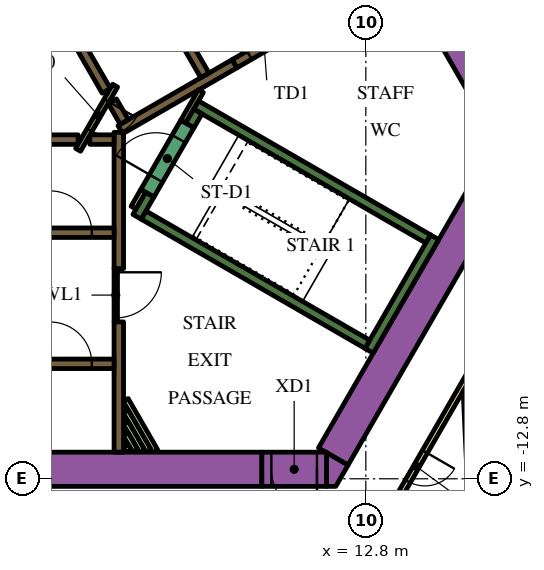
"""IFC4 building model, lengths in metres.
Left out: names, types, materials, properties, quantities, classifications, styles, units other than length and angle.
Written with IfcOpenShell. Run it as: python <this file> out.ifc"""

import sys

from ifc_helpers import new_model, si_unit, direction, frame, frame_2d, origin, place, context, subcontext, project, spatial, polyline, rectangle, outline, extrude, element, fill, save


model = new_model("IFC4")
c1 = context("Model", 3, precision=1e-05, world=origin(), true_north=direction((0.0, 1.0)))
c2 = subcontext(c1, "Body", "Model", "MODEL_VIEW")
j1 = project(units=[si_unit("LENGTHUNIT", "METRE"), si_unit("PLANEANGLEUNIT", "RADIAN")], contexts=[c1])
p1 = place(None, origin())
s1 = spatial("IfcSite", under=j1, at=p1, CompositionType="ELEMENT")
p2 = place(p1, origin())
s2 = spatial("IfcBuilding", under=s1, at=p2, CompositionType="ELEMENT")
p3 = place(p2, frame((0.0, 0.0, 43.2)))
s3 = spatial("IfcBuildingStorey", under=s2, at=p3, CompositionType="ELEMENT", Elevation=43.2)
p4 = place(p3, frame((6.776, 13.364, 0.0), z_axis=(0.0, 0.0, 1.0), x_axis=(0.500004177138, -0.8660229921, 0.0)))
e1 = element("IfcWall", 1, at=p4, inside=s3, PredefinedType="SOLIDWALL", context=c2, shape_type="SweptSolid", body=[
    extrude(rectangle(XDim=20.204, YDim=0.9, at=frame_2d((10.102, 0.0))), origin(), (0.0, 0.0, 1.0), 3.9),
])
p5 = place(p3, frame((11.943, -12.214, 0.0), z_axis=(0.0, 0.0, 1.0), x_axis=(0.49998092645, 0.866036415623, 0.0)))
e2 = element("IfcWall", 2, at=p5, inside=s3, PredefinedType="SOLIDWALL", context=c2, shape_type="SweptSolid", body=[
    extrude(rectangle(XDim=8.83, YDim=0.9, at=frame_2d((4.415, 0.0))), origin(), (0.0, 0.0, 1.0), 3.9),
])
p6 = place(p3, origin())
e3 = element("IfcWall", 3, at=p6, inside=s3, PredefinedType="SOLIDWALL", context=c2, shape_type="SweptSolid", body=[
    extrude(outline(polyline([(12.009, -13.0), (11.764, -13.0), (11.764, -12.113), (12.332, -12.441), (12.009, -13.0)])), origin(), (0.0, 0.0, 1.0), 3.9),
])
p7 = place(p3, frame((-12.019, -12.55, 0.0), z_axis=(0.0, 0.0, 1.0), x_axis=(1.0, 0.0, 0.0)))
e4 = element("IfcWall", 4, at=p7, inside=s3, PredefinedType="SOLIDWALL", context=c2, shape_type="SweptSolid", body=[
    extrude(rectangle(XDim=22.083, YDim=0.9, at=frame_2d((11.042, 0.0))), origin(), (0.0, 0.0, 1.0), 3.9),
])
p8 = place(p3, frame((12.885, -9.431, 0.0), z_axis=(0.0, 0.0, 1.0), x_axis=(0.500020560727, 0.866013532718, 0.0)))
e5 = element("IfcWall", 5, at=p8, inside=s3, PredefinedType="SOLIDWALL", context=c2, shape_type="SweptSolid", body=[
    extrude(rectangle(XDim=3.45, YDim=0.25, at=frame_2d((1.725, 0.0))), origin(), (0.0, 0.0, 1.0), 3.9),
])
p9 = place(p3, frame((12.84, -9.261, 0.0), z_axis=(0.0, 0.0, 1.0), x_axis=(-0.866013990052, 0.500019768644, 0.0)))
e6 = element("IfcWall", 6, at=p9, inside=s3, PredefinedType="SOLIDWALL", context=c2, shape_type="SweptSolid", body=[
    extrude(rectangle(XDim=6.8, YDim=0.25, at=frame_2d((3.4, 0.0))), origin(), (0.0, 0.0, 1.0), 3.9),
])
p10 = place(p3, frame((6.78, -5.906, 0.0), z_axis=(0.0, 0.0, 1.0), x_axis=(0.500223362819, 0.865896406789, 0.0)))
e7 = element("IfcWall", 7, at=p10, inside=s3, PredefinedType="SOLIDWALL", context=c2, shape_type="SweptSolid", body=[
    extrude(rectangle(XDim=0.675, YDim=0.25, at=frame_2d((0.337, 0.0))), origin(), (0.0, 0.0, 1.0), 3.9),
])
p11 = place(p3, frame((8.334, -2.964, 0.0), z_axis=(0.0, 0.0, 1.0), x_axis=(0.866016039709, -0.500016218704, 0.0)))
e8 = element("IfcWall", 8, at=p11, inside=s3, PredefinedType="SOLIDWALL", context=c2, shape_type="SweptSolid", body=[
    extrude(rectangle(XDim=7.05, YDim=0.25, at=frame_2d((3.525, 0.0))), origin(), (0.0, 0.0, 1.0), 3.9),
])
p12 = place(p3, frame((8.168, -3.503, 0.0), z_axis=(0.0, 0.0, 1.0), x_axis=(0.49972245349, 0.866185586049, 0.0)))
e9 = element("IfcWall", 9, at=p12, inside=s3, PredefinedType="SOLIDWALL", context=c2, shape_type="SweptSolid", body=[
    extrude(rectangle(XDim=0.425, YDim=0.25, at=frame_2d((0.212, 0.0))), origin(), (0.0, 0.0, 1.0), 3.9),
])
p13 = place(p3, frame((-5.259, -3.875, 0.0), z_axis=(0.0, 0.0, 1.0), x_axis=(1.0, 0.0, 0.0)))
e10 = element("IfcWall", 10, at=p13, inside=s3, PredefinedType="SOLIDWALL", context=c2, shape_type="SweptSolid", body=[
    extrude(rectangle(XDim=10.489, YDim=0.25, at=frame_2d((5.244, 0.0))), origin(), (0.0, 0.0, 1.0), 3.9),
])
p14 = place(p3, frame((6.3, -7.27, 0.0), z_axis=(0.0, 0.0, 1.0), x_axis=(0.0, 1.0, 0.0)))
e11 = element("IfcWall", 11, at=p14, inside=s3, PredefinedType="SOLIDWALL", context=c2, shape_type="SweptSolid", body=[
    extrude(rectangle(XDim=3.586, YDim=0.25, at=frame_2d((1.793, 0.0))), origin(), (0.0, 0.0, 1.0), 3.9),
])
p15 = place(p3, frame((6.3, -12.1, 0.0), z_axis=(0.0, 0.0, 1.0), x_axis=(0.0, 1.0, 0.0)))
e12 = element("IfcWall", 12, at=p15, inside=s3, PredefinedType="SOLIDWALL", context=c2, shape_type="SweptSolid", body=[
    extrude(rectangle(XDim=3.428, YDim=0.25, at=frame_2d((1.714, 0.0))), origin(), (0.0, 0.0, 1.0), 3.9),
])
p16 = place(p3, frame((5.538, -3.875, 0.0), z_axis=(0.0, 0.0, 1.0), x_axis=(1.0, 0.0, 0.0)))
e13 = element("IfcWall", 13, at=p16, inside=s3, PredefinedType="SOLIDWALL", context=c2, shape_type="SweptSolid", body=[
    extrude(rectangle(XDim=0.637, YDim=0.25, at=frame_2d((0.318, 0.0))), origin(), (0.0, 0.0, 1.0), 3.9),
])
p17 = place(p3, frame((9.346, -1.879, 0.0), z_axis=(0.0, 0.0, 1.0), x_axis=(-0.866048528039, -0.499959945477, 0.0)))
e14 = element("IfcWall", 14, at=p17, inside=s3, PredefinedType="SOLIDWALL", context=c2, shape_type="SweptSolid", body=[
    extrude(rectangle(XDim=3.47, YDim=0.25, at=frame_2d((1.735, 0.0))), origin(), (0.0, 0.0, 1.0), 3.9),
])
p18 = place(p3, frame((6.13, -2.867, 0.0), z_axis=(0.0, 0.0, 1.0), x_axis=(0.500160776593, -0.865932559475, 0.0)))
e15 = element("IfcWall", 15, at=p18, inside=s3, PredefinedType="SOLIDWALL", context=c2, shape_type="SweptSolid", body=[
    extrude(rectangle(XDim=0.627, YDim=0.25, at=frame_2d((0.313, 0.0))), origin(), (0.0, 0.0, 1.0), 3.9),
])
p19 = place(p3, frame((5.97, -2.591, 0.0), z_axis=(0.0, 0.0, 1.0), x_axis=(-0.499994469932, 0.866028596547, 0.0)))
e16 = element("IfcWall", 16, at=p19, inside=s3, PredefinedType="SOLIDWALL", context=c2, shape_type="SweptSolid", body=[
    extrude(rectangle(XDim=10.488, YDim=0.25, at=frame_2d((5.244, 0.0))), origin(), (0.0, 0.0, 1.0), 3.9),
])
p20 = place(p3, frame((6.48, -10.726, 0.0), z_axis=(0.0, 0.0, 1.0), x_axis=(0.500017819788, -0.86601511528, 0.0)))
e17 = element("IfcWall", 17, at=p20, inside=s3, PredefinedType="PARTITIONING", context=c2, shape_type="SweptSolid", body=[
    extrude(rectangle(XDim=1.55, YDim=0.15, at=frame_2d((0.775, 0.0))), origin(), (0.0, 0.0, 1.0), 2.75),
])
p21 = place(p3, frame((6.48, -11.026, 0.0), z_axis=(0.0, 0.0, 1.0), x_axis=(0.49995654735, -0.86605048973, 0.0)))
e18 = element("IfcWall", 18, at=p21, inside=s3, PredefinedType="PARTITIONING", context=c2, shape_type="SweptSolid", body=[
    extrude(rectangle(XDim=1.204, YDim=0.15, at=frame_2d((0.602, 0.0))), origin(), (0.0, 0.0, 1.0), 2.75),
])
p22 = place(p3, frame((6.48, -11.326, 0.0), z_axis=(0.0, 0.0, 1.0), x_axis=(0.500059337743, -0.865991142412, 0.0)))
e19 = element("IfcWall", 19, at=p22, inside=s3, PredefinedType="PARTITIONING", context=c2, shape_type="SweptSolid", body=[
    extrude(rectangle(XDim=0.857, YDim=0.15, at=frame_2d((0.429, 0.0))), origin(), (0.0, 0.0, 1.0), 2.75),
])
p23 = place(p3, frame((6.48, -11.626, 0.0), z_axis=(0.0, 0.0, 1.0), x_axis=(0.500301480982, -0.865851273677, 0.0)))
e20 = element("IfcWall", 20, at=p23, inside=s3, PredefinedType="PARTITIONING", context=c2, shape_type="SweptSolid", body=[
    extrude(rectangle(XDim=0.511, YDim=0.15, at=frame_2d((0.255, 0.0))), origin(), (0.0, 0.0, 1.0), 2.75),
])
p24 = place(p3, frame((6.48, -11.926, 0.0), z_axis=(0.0, 0.0, 1.0), x_axis=(0.500450775723, -0.86576499183, 0.0)))
e21 = element("IfcWall", 21, at=p24, inside=s3, PredefinedType="PARTITIONING", context=c2, shape_type="SweptSolid", body=[
    extrude(rectangle(XDim=0.164, YDim=0.15, at=frame_2d((0.082, 0.0))), origin(), (0.0, 0.0, 1.0), 2.75),
])
p25 = place(p3, frame((6.945, -5.222, 0.0), z_axis=(0.0, 0.0, 1.0), x_axis=(-0.499818422106, -0.866130212453, 0.0)))
e22 = element("IfcWall", 22, at=p25, inside=s3, PredefinedType="PARTITIONING", context=c2, shape_type="SweptSolid", body=[
    extrude(rectangle(XDim=0.514, YDim=0.15, at=frame_2d((0.257, 0.0))), origin(), (0.0, 0.0, 1.0), 2.75),
])
p26 = place(p3, frame((8.459, -2.599, 0.0), z_axis=(0.0, 0.0, 1.0), x_axis=(-0.500041054325, -0.866001699761, 0.0)))
e23 = element("IfcWall", 23, at=p26, inside=s3, PredefinedType="PARTITIONING", context=c2, shape_type="SweptSolid", body=[
    extrude(rectangle(XDim=0.929, YDim=0.15, at=frame_2d((0.464, 0.0))), origin(), (0.0, 0.0, 1.0), 3.9),
])
p27 = place(p3, frame((-6.175, -9.775, 0.0), z_axis=(0.0, 0.0, 1.0), x_axis=(1.0, 0.0, 0.0)))
e24 = element("IfcWall", 24, at=p27, inside=s3, PredefinedType="SOLIDWALL", context=c2, shape_type="SweptSolid", body=[
    extrude(rectangle(XDim=12.35, YDim=0.25, at=frame_2d((6.175, 0.0))), origin(), (0.0, 0.0, 1.0), 3.9),
])
p28 = place(p27, frame((0.585, 0.0, 0.0)))
e25 = element("IfcOpeningElement", 25, at=p28, cuts=e24, PredefinedType="OPENING", context=c2, shape_type="SweptSolid", body=[
    extrude(rectangle(XDim=1.1, YDim=2.1, at=frame_2d((0.55, 1.05))), frame((0.0, 0.135, 0.0), z_axis=(0.0, -1.0, 0.0), x_axis=(1.0, 0.0, 0.0)), (0.0, 0.0, 1.0), 0.27),
])
p29 = place(p27, frame((3.105, 0.0, 0.0)))
e26 = element("IfcOpeningElement", 26, at=p29, cuts=e24, PredefinedType="OPENING", context=c2, shape_type="SweptSolid", body=[
    extrude(rectangle(XDim=1.1, YDim=2.1, at=frame_2d((0.55, 1.05))), frame((0.0, 0.135, 0.0), z_axis=(0.0, -1.0, 0.0), x_axis=(1.0, 0.0, 0.0)), (0.0, 0.0, 1.0), 0.27),
])
p30 = place(p27, frame((5.625, 0.0, 0.0)))
e27 = element("IfcOpeningElement", 27, at=p30, cuts=e24, PredefinedType="OPENING", context=c2, shape_type="SweptSolid", body=[
    extrude(rectangle(XDim=1.1, YDim=2.1, at=frame_2d((0.55, 1.05))), frame((0.0, 0.135, 0.0), z_axis=(0.0, -1.0, 0.0), x_axis=(1.0, 0.0, 0.0)), (0.0, 0.0, 1.0), 0.27),
])
p31 = place(p27, frame((8.145, 0.0, 0.0)))
e28 = element("IfcOpeningElement", 28, at=p31, cuts=e24, PredefinedType="OPENING", context=c2, shape_type="SweptSolid", body=[
    extrude(rectangle(XDim=1.1, YDim=2.1, at=frame_2d((0.55, 1.05))), frame((0.0, 0.135, 0.0), z_axis=(0.0, -1.0, 0.0), x_axis=(1.0, 0.0, 0.0)), (0.0, 0.0, 1.0), 0.27),
])
p32 = place(p27, frame((10.665, 0.0, 0.0)))
e29 = element("IfcOpeningElement", 29, at=p32, cuts=e24, PredefinedType="OPENING", context=c2, shape_type="SweptSolid", body=[
    extrude(rectangle(XDim=1.1, YDim=2.1, at=frame_2d((0.55, 1.05))), frame((0.0, 0.135, 0.0), z_axis=(0.0, -1.0, 0.0), x_axis=(1.0, 0.0, 0.0)), (0.0, 0.0, 1.0), 0.27),
])
p33 = place(p3, frame((-6.175, -6.325, 0.0), z_axis=(0.0, 0.0, 1.0), x_axis=(1.0, 0.0, 0.0)))
e30 = element("IfcWall", 30, at=p33, inside=s3, PredefinedType="SOLIDWALL", context=c2, shape_type="SweptSolid", body=[
    extrude(rectangle(XDim=12.35, YDim=0.25, at=frame_2d((6.175, 0.0))), origin(), (0.0, 0.0, 1.0), 3.9),
])
p34 = place(p33, frame((3.205, 0.0, 0.0)))
e31 = element("IfcOpeningElement", 31, at=p34, cuts=e30, PredefinedType="OPENING", context=c2, shape_type="SweptSolid", body=[
    extrude(rectangle(XDim=0.9, YDim=2.1, at=frame_2d((0.45, 1.05))), frame((0.0, 0.135, 0.0), z_axis=(0.0, -1.0, 0.0), x_axis=(1.0, 0.0, 0.0)), (0.0, 0.0, 1.0), 0.27),
])
p35 = place(p33, frame((8.145, 0.0, 0.0)))
e32 = element("IfcOpeningElement", 32, at=p35, cuts=e30, PredefinedType="OPENING", context=c2, shape_type="SweptSolid", body=[
    extrude(rectangle(XDim=1.1, YDim=2.1, at=frame_2d((0.55, 1.05))), frame((0.0, 0.135, 0.0), z_axis=(0.0, -1.0, 0.0), x_axis=(1.0, 0.0, 0.0)), (0.0, 0.0, 1.0), 0.27),
])
p36 = place(p33, frame((10.665, 0.0, 0.0)))
e33 = element("IfcOpeningElement", 33, at=p36, cuts=e30, PredefinedType="OPENING", context=c2, shape_type="SweptSolid", body=[
    extrude(rectangle(XDim=1.1, YDim=2.1, at=frame_2d((0.55, 1.05))), frame((0.0, 0.135, 0.0), z_axis=(0.0, -1.0, 0.0), x_axis=(1.0, 0.0, 0.0)), (0.0, 0.0, 1.0), 0.27),
])
p37 = place(p3, frame((8.565, -2.185, 0.0), z_axis=(0.0, 0.0, 1.0), x_axis=(-0.499997954832, 0.866026584559, 0.0)))
e34 = element("IfcWall", 34, at=p37, inside=s3, PredefinedType="SOLIDWALL", context=c2, shape_type="SweptSolid", body=[
    extrude(rectangle(XDim=12.35, YDim=0.25, at=frame_2d((6.175, 0.0))), origin(), (0.0, 0.0, 1.0), 3.9),
])
p38 = place(p37, frame((5.725, 0.0, 0.0)))
e35 = element("IfcOpeningElement", 35, at=p38, cuts=e34, PredefinedType="OPENING", context=c2, shape_type="SweptSolid", body=[
    extrude(rectangle(XDim=0.9, YDim=2.1, at=frame_2d((0.45, 1.05))), frame((0.0, 0.135, 0.0), z_axis=(0.0, -1.0, 0.0), x_axis=(1.0, 0.0, 0.0)), (0.0, 0.0, 1.0), 0.27),
])
p39 = place(p3, frame((7.053, -5.284, 0.0), z_axis=(0.0, 0.0, 1.0), x_axis=(0.500078061341, 0.865980330357, 0.0)))
e36 = element("IfcWall", 36, at=p39, inside=s3, PredefinedType="SOLIDWALL", context=c2, shape_type="SweptSolid", body=[
    extrude(rectangle(XDim=2.1, YDim=0.4, at=frame_2d((1.05, 0.0))), origin(), (0.0, 0.0, 1.0), 3.9),
])
p40 = place(p39, frame((0.45, 0.0, 0.0)))
e37 = element("IfcOpeningElement", 37, at=p40, cuts=e36, PredefinedType="OPENING", context=c2, shape_type="SweptSolid", body=[
    extrude(rectangle(XDim=1.2, YDim=2.1, at=frame_2d((0.6, 1.05))), frame((0.0, 0.21, 0.0), z_axis=(0.0, -1.0, 0.0), x_axis=(1.0, 0.0, 0.0)), (0.0, 0.0, 1.0), 0.42),
])
p41 = place(p3, frame((9.346, -1.879, 0.0), z_axis=(0.0, 0.0, 1.0), x_axis=(0.866047807691, 0.499961193289, 0.0)))
e38 = element("IfcWall", 38, at=p41, inside=s3, PredefinedType="SOLIDWALL", context=c2, shape_type="SweptSolid", body=[
    extrude(rectangle(XDim=1.8, YDim=0.25, at=frame_2d((0.9, 0.0))), origin(), (0.0, 0.0, 1.0), 3.9),
])
p42 = place(p41, frame((0.45, 0.0, 0.0)))
e39 = element("IfcOpeningElement", 39, at=p42, cuts=e38, PredefinedType="OPENING", context=c2, shape_type="SweptSolid", body=[
    extrude(rectangle(XDim=0.9, YDim=2.1, at=frame_2d((0.45, 1.05))), frame((0.0, 0.135, 0.0), z_axis=(0.0, -1.0, 0.0), x_axis=(1.0, 0.0, 0.0)), (0.0, 0.0, 1.0), 0.27),
])
p43 = place(p3, frame((6.203, -2.456, 0.0), z_axis=(0.0, 0.0, 1.0), x_axis=(-0.500043961785, -0.866000020948, 0.0)))
e40 = element("IfcWall", 40, at=p43, inside=s3, PredefinedType="PARTITIONING", context=c2, shape_type="SweptSolid", body=[
    extrude(rectangle(XDim=1.95, YDim=0.15, at=frame_2d((0.975, 0.0))), origin(), (0.0, 0.0, 1.0), 3.9),
])
p44 = place(p43, frame((0.45, 0.0, 0.0)))
e41 = element("IfcOpeningElement", 41, at=p44, cuts=e40, PredefinedType="OPENING", context=c2, shape_type="SweptSolid", body=[
    extrude(rectangle(XDim=0.9, YDim=2.1, at=frame_2d((0.45, 1.05))), frame((0.0, 0.085, 0.0), z_axis=(0.0, -1.0, 0.0), x_axis=(1.0, 0.0, 0.0)), (0.0, 0.0, 1.0), 0.17),
])
p45 = place(p3, frame((6.22, -7.266, 0.0), z_axis=(0.0, 0.0, 1.0), x_axis=(0.0, -1.0, 0.0)))
e42 = element("IfcWall", 42, at=p45, inside=s3, PredefinedType="PARTITIONING", context=c2, shape_type="SweptSolid", body=[
    extrude(rectangle(XDim=1.4, YDim=0.09, at=frame_2d((0.7, 0.0))), origin(), (0.0, 0.0, 1.0), 2.75),
])
p46 = place(p45, frame((0.1, 0.0, 0.0)))
e43 = element("IfcOpeningElement", 43, at=p46, cuts=e42, PredefinedType="OPENING", context=c2, shape_type="SweptSolid", body=[
    extrude(rectangle(XDim=1.2, YDim=2.1, at=frame_2d((0.6, 1.05))), frame((0.0, 0.055, 0.0), z_axis=(0.0, -1.0, 0.0), x_axis=(1.0, 0.0, 0.0)), (0.0, 0.0, 1.0), 0.11),
])
p47 = place(p3, frame((11.764, -12.55, 0.0), z_axis=(0.0, 0.0, 1.0), x_axis=(-1.0, 0.0, 0.0)))
e44 = element("IfcWall", 44, at=p47, inside=s3, PredefinedType="SOLIDWALL", context=c2, shape_type="SweptSolid", body=[
    extrude(rectangle(XDim=1.7, YDim=0.9, at=frame_2d((0.85, 0.0))), origin(), (0.0, 0.0, 1.0), 3.9),
])
p48 = place(p47, frame((0.25, 0.0, 0.0)))
e45 = element("IfcOpeningElement", 45, at=p48, cuts=e44, PredefinedType="OPENING", context=c2, shape_type="SweptSolid", body=[
    extrude(rectangle(XDim=1.2, YDim=2.1, at=frame_2d((0.6, 1.05))), frame((0.0, 0.46, 0.0), z_axis=(0.0, -1.0, 0.0), x_axis=(1.0, 0.0, 0.0)), (0.0, 0.0, 1.0), 0.92),
])
p49 = place(p3, frame((6.163, 18.475, 0.0), z_axis=(0.0, 0.0, 1.0), x_axis=(0.500001317485, -0.866024643133, 0.0)))
e46 = element("IfcWall", 46, at=p49, inside=s3, PredefinedType="PARTITIONING", context=c2, shape_type="SweptSolid", body=[
    extrude(rectangle(XDim=25.767, YDim=0.15, at=frame_2d((12.883, 0.0))), origin(), (0.0, 0.0, 1.0), 2.75),
])
p50 = place(p49, frame((24.586, 0.0, 0.0)))
e47 = element("IfcOpeningElement", 47, at=p50, cuts=e46, PredefinedType="OPENING", context=c2, shape_type="SweptSolid", body=[
    extrude(rectangle(XDim=1.0, YDim=2.1, at=frame_2d((0.5, 1.05))), frame((0.0, 0.085, 0.0), z_axis=(0.0, -1.0, 0.0), x_axis=(1.0, 0.0, 0.0)), (0.0, 0.0, 1.0), 0.17),
])
p51 = place(p49, frame((16.196, 0.0, 0.0)))
e48 = element("IfcOpeningElement", 48, at=p51, cuts=e46, PredefinedType="OPENING", context=c2, shape_type="SweptSolid", body=[
    extrude(rectangle(XDim=1.0, YDim=2.1, at=frame_2d((0.5, 1.05))), frame((0.0, 0.085, 0.0), z_axis=(0.0, -1.0, 0.0), x_axis=(1.0, 0.0, 0.0)), (0.0, 0.0, 1.0), 0.17),
])
p52 = place(p49, frame((14.789, 0.0, 0.0)))
e49 = element("IfcOpeningElement", 49, at=p52, cuts=e46, PredefinedType="OPENING", context=c2, shape_type="SweptSolid", body=[
    extrude(rectangle(XDim=1.1, YDim=2.1, at=frame_2d((0.55, 1.05))), frame((0.0, 0.085, 0.0), z_axis=(0.0, -1.0, 0.0), x_axis=(1.0, 0.0, 0.0)), (0.0, 0.0, 1.0), 0.17),
])
p53 = place(p49, frame((3.698, 0.0, 0.0)))
e50 = element("IfcOpeningElement", 50, at=p53, cuts=e46, PredefinedType="OPENING", context=c2, shape_type="SweptSolid", body=[
    extrude(rectangle(XDim=1.0, YDim=2.1, at=frame_2d((0.5, 1.05))), frame((0.0, 0.085, 0.0), z_axis=(0.0, -1.0, 0.0), x_axis=(1.0, 0.0, 0.0)), (0.0, 0.0, 1.0), 0.17),
])
p54 = place(p49, frame((2.391, 0.0, 0.0)))
e51 = element("IfcOpeningElement", 51, at=p54, cuts=e46, PredefinedType="OPENING", context=c2, shape_type="SweptSolid", body=[
    extrude(rectangle(XDim=1.0, YDim=2.1, at=frame_2d((0.5, 1.05))), frame((0.0, 0.085, 0.0), z_axis=(0.0, -1.0, 0.0), x_axis=(1.0, 0.0, 0.0)), (0.0, 0.0, 1.0), 0.17),
])
p55 = place(p3, frame((15.587, -9.952, 0.0), z_axis=(0.0, 0.0, 1.0), x_axis=(-0.500016618951, -0.866015808616, 0.0)))
e52 = element("IfcWall", 52, at=p55, inside=s3, PredefinedType="PARTITIONING", context=c2, shape_type="SweptSolid", body=[
    extrude(rectangle(XDim=5.268, YDim=0.15, at=frame_2d((2.634, 0.0))), origin(), (0.0, 0.0, 1.0), 2.75),
])
p56 = place(p55, frame((2.465, 0.0, 0.0)))
e53 = element("IfcOpeningElement", 53, at=p56, cuts=e52, PredefinedType="OPENING", context=c2, shape_type="SweptSolid", body=[
    extrude(rectangle(XDim=0.9, YDim=2.1, at=frame_2d((0.45, 1.05))), frame((0.0, 0.085, 0.0), z_axis=(0.0, -1.0, 0.0), x_axis=(1.0, 0.0, 0.0)), (0.0, 0.0, 1.0), 0.17),
])
p57 = place(p3, frame((15.973, -22.109, 0.0), z_axis=(0.0, 0.0, 1.0), x_axis=(-0.046191717129, 0.998932592955, 0.0)))
e54 = element("IfcWall", 54, at=p57, inside=s3, PredefinedType="PARTITIONING", context=c2, shape_type="SweptSolid", body=[
    extrude(rectangle(XDim=11.638, YDim=0.15, at=frame_2d((5.819, 0.0))), origin(), (0.0, 0.0, 1.0), 2.75),
])
p58 = place(p32, origin())
e55 = element("IfcDoor", 55, at=p58, inside=s3, OperationType="DOUBLE_DOOR_SLIDING", PredefinedType="DOOR", context=c2, shape_type="SweptSolid", body=[
    extrude(rectangle(XDim=1.1, YDim=2.1, at=frame_2d((0.55, 1.05))), frame((0.0, 0.025, 0.0), z_axis=(0.0, -1.0, 0.0), x_axis=(1.0, 0.0, 0.0)), (0.0, 0.0, 1.0), 0.05),
])
fill(e29, e55)
p59 = place(p36, origin())
e56 = element("IfcDoor", 56, at=p59, inside=s3, OperationType="DOUBLE_DOOR_SLIDING", PredefinedType="DOOR", context=c2, shape_type="SweptSolid", body=[
    extrude(rectangle(XDim=1.1, YDim=2.1, at=frame_2d((0.55, 1.05))), frame((0.0, 0.025, 0.0), z_axis=(0.0, -1.0, 0.0), x_axis=(1.0, 0.0, 0.0)), (0.0, 0.0, 1.0), 0.05),
])
fill(e33, e56)
p60 = place(p40, origin())
e57 = element("IfcDoor", 57, at=p60, inside=s3, OperationType="SINGLE_SWING_LEFT", PredefinedType="DOOR", context=c2, shape_type="SweptSolid", body=[
    extrude(rectangle(XDim=1.2, YDim=2.1, at=frame_2d((0.6, 1.05))), frame((0.0, 0.025, 0.0), z_axis=(0.0, -1.0, 0.0), x_axis=(1.0, 0.0, 0.0)), (0.0, 0.0, 1.0), 0.05),
])
fill(e37, e57)
p61 = place(p42, origin())
e58 = element("IfcDoor", 58, at=p61, inside=s3, OperationType="SINGLE_SWING_LEFT", PredefinedType="DOOR", context=c2, shape_type="SweptSolid", body=[
    extrude(rectangle(XDim=0.9, YDim=2.1, at=frame_2d((0.45, 1.05))), frame((0.0, 0.025, 0.0), z_axis=(0.0, -1.0, 0.0), x_axis=(1.0, 0.0, 0.0)), (0.0, 0.0, 1.0), 0.05),
])
fill(e39, e58)
p62 = place(p44, origin())
e59 = element("IfcDoor", 59, at=p62, inside=s3, OperationType="SINGLE_SWING_LEFT", PredefinedType="DOOR", context=c2, shape_type="SweptSolid", body=[
    extrude(rectangle(XDim=0.9, YDim=2.1, at=frame_2d((0.45, 1.05))), frame((0.0, 0.025, 0.0), z_axis=(0.0, -1.0, 0.0), x_axis=(1.0, 0.0, 0.0)), (0.0, 0.0, 1.0), 0.05),
])
fill(e41, e59)
p63 = place(p46, origin())
e60 = element("IfcDoor", 60, at=p63, inside=s3, OperationType="SINGLE_SWING_LEFT", PredefinedType="DOOR", context=c2, shape_type="SweptSolid", body=[
    extrude(rectangle(XDim=1.2, YDim=2.1, at=frame_2d((0.6, 1.05))), frame((0.0, 0.025, 0.0), z_axis=(0.0, -1.0, 0.0), x_axis=(1.0, 0.0, 0.0)), (0.0, 0.0, 1.0), 0.05),
])
fill(e43, e60)
p64 = place(p48, origin())
e61 = element("IfcDoor", 61, at=p64, inside=s3, OperationType="SINGLE_SWING_LEFT", PredefinedType="DOOR", context=c2, shape_type="SweptSolid", body=[
    extrude(rectangle(XDim=1.2, YDim=2.1, at=frame_2d((0.6, 1.05))), frame((0.0, 0.025, 0.0), z_axis=(0.0, -1.0, 0.0), x_axis=(1.0, 0.0, 0.0)), (0.0, 0.0, 1.0), 0.05),
])
fill(e45, e61)
p65 = place(p56, origin())
e62 = element("IfcDoor", 62, at=p65, inside=s3, OperationType="SINGLE_SWING_LEFT", PredefinedType="DOOR", context=c2, shape_type="SweptSolid", body=[
    extrude(rectangle(XDim=0.9, YDim=2.1, at=frame_2d((0.45, 1.05))), frame((0.0, 0.025, 0.0), z_axis=(0.0, -1.0, 0.0), x_axis=(1.0, 0.0, 0.0)), (0.0, 0.0, 1.0), 0.05),
])
fill(e53, e62)
save(model, sys.argv[1])
